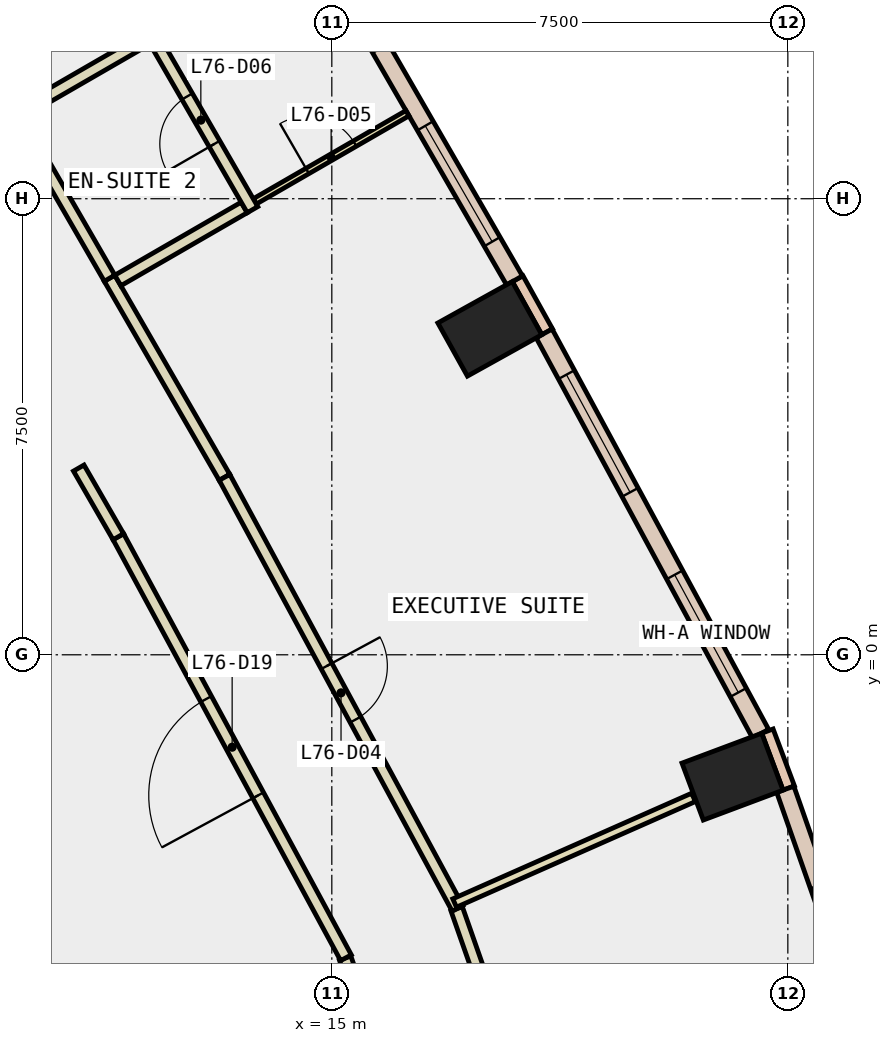
"""IFC4 building model, lengths in metres.
Left out: names, types, materials, properties, quantities, classifications, styles, units other than length and angle.
Written with IfcOpenShell. Run it as: python <this file> out.ifc"""

import sys

from ifc_helpers import new_model, si_unit, direction, frame, frame_2d, origin, origin_2d, place, context, subcontext, project, spatial, rectangle, extrude, element, fill, save


model = new_model("IFC4")
c1 = context("Model", 3, precision=1e-05, world=origin(), true_north=direction((0.0, 1.0)))
c2 = subcontext(c1, "Body", "Model", "MODEL_VIEW")
j1 = project(units=[si_unit("LENGTHUNIT", "METRE"), si_unit("PLANEANGLEUNIT", "RADIAN")], contexts=[c1])
p1 = place(None, origin())
s1 = spatial("IfcSite", under=j1, at=p1, CompositionType="ELEMENT")
p2 = place(p1, origin())
s2 = spatial("IfcBuilding", under=s1, at=p2, CompositionType="ELEMENT")
p3 = place(p2, frame((0.0, 0.0, 322.4)))
s3 = spatial("IfcBuildingStorey", under=s2, at=p3, CompositionType="ELEMENT", Elevation=322.4)
for number, where, z_axis, x_axis in (
    (1, (21.59, -2.004, -0.34), (0.0, 0.0, 1.0), (-0.351, 0.936, 0.0)),
    (2, (17.599, 5.36, -0.34), (0.0, 0.0, 1.0), (-0.486, 0.874, 0.0)),
):
    element("IfcColumn", number, at=place(p3, frame(where, z_axis=z_axis, x_axis=x_axis)), inside=s3, PredefinedType="COLUMN", context=c2, shape_type="SweptSolid", body=[
        extrude(rectangle(XDim=1.0, YDim=1.4, at=origin_2d()), origin(), (0.0, 0.0, 1.0), 3.34),
    ])
p4 = place(p3, frame((6.279, -3.625, -0.34), z_axis=(0.0, 0.0, 1.0), x_axis=(0.866017533419, -0.500013631625, 0.0)))
e3 = element("IfcWall", 3, at=p4, inside=s3, PredefinedType="SHEAR", context=c2, shape_type="SweptSolid", body=[
    extrude(rectangle(XDim=9.0, YDim=0.8, at=frame_2d((4.5, 0.0))), origin(), (0.0, 0.0, 1.0), 3.34),
])
p5 = place(p3, frame((22.515, -2.191, 0.0), z_axis=(0.0, 0.0, 1.0), x_axis=(-0.350962844851, 0.936389385637, 0.0)))
e4 = element("IfcWall", 4, at=p5, inside=s3, PredefinedType="STANDARD", context=c2, shape_type="SweptSolid", body=[
    extrude(rectangle(XDim=1.0, YDim=0.2, at=frame_2d((0.5, 0.0))), origin(), (0.0, 0.0, 1.0), 3.0),
])
p6 = place(p3, frame((18.542, 5.311, 0.0), z_axis=(0.0, 0.0, 1.0), x_axis=(-0.486036693078, 0.873938403425, 0.0)))
e5 = element("IfcWall", 5, at=p6, inside=s3, PredefinedType="STANDARD", context=c2, shape_type="SweptSolid", body=[
    extrude(rectangle(XDim=1.0, YDim=0.2, at=frame_2d((0.5, 0.0))), origin(), (0.0, 0.0, 1.0), 3.0),
])
p7 = place(p3, frame((24.029, -6.692, 0.0), z_axis=(0.0, 0.0, 1.0), x_axis=(-0.330923030855, 0.943657749213, 0.0)))
e6 = element("IfcWall", 6, at=p7, inside=s3, PredefinedType="STANDARD", context=c2, shape_type="SweptSolid", body=[
    extrude(rectangle(XDim=4.748, YDim=0.3, at=frame_2d((2.374, 0.0))), origin(), (0.0, 0.0, 1.0), 3.0),
])
p8 = place(p7, frame((1.674, 0.0, 0.9)))
e7 = element("IfcOpeningElement", 7, at=p8, cuts=e6, PredefinedType="OPENING", context=c2, shape_type="SweptSolid", body=[
    extrude(rectangle(XDim=1.4, YDim=2.0, at=frame_2d((0.7, 1.0))), frame((0.0, 0.16, 0.0), z_axis=(0.0, -1.0, 0.0), x_axis=(1.0, 0.0, 0.0)), (0.0, 0.0, 1.0), 0.32),
])
p9 = place(p3, frame((22.052, -1.298, 0.0), z_axis=(0.0, 0.0, 1.0), x_axis=(-0.475690331633, 0.879612817319, 0.0)))
e8 = element("IfcWall", 8, at=p9, inside=s3, PredefinedType="STANDARD", context=c2, shape_type="SweptSolid", body=[
    extrude(rectangle(XDim=7.484, YDim=0.3, at=frame_2d((3.742, 0.0))), origin(), (0.0, 0.0, 1.0), 3.0),
])
p10 = place(p9, frame((0.771, 0.0, 0.9)))
e9 = element("IfcOpeningElement", 9, at=p10, cuts=e8, PredefinedType="OPENING", context=c2, shape_type="SweptSolid", body=[
    extrude(rectangle(XDim=2.2, YDim=2.0, at=frame_2d((1.1, 1.0))), frame((0.0, 0.16, 0.0), z_axis=(0.0, -1.0, 0.0), x_axis=(1.0, 0.0, 0.0)), (0.0, 0.0, 1.0), 0.32),
])
p11 = place(p9, frame((4.513, 0.0, 0.9)))
e10 = element("IfcOpeningElement", 10, at=p11, cuts=e8, PredefinedType="OPENING", context=c2, shape_type="SweptSolid", body=[
    extrude(rectangle(XDim=2.2, YDim=2.0, at=frame_2d((1.1, 1.0))), frame((0.0, 0.16, 0.0), z_axis=(0.0, -1.0, 0.0), x_axis=(1.0, 0.0, 0.0)), (0.0, 0.0, 1.0), 0.32),
])
p12 = place(p3, frame((18.005, 6.156, 0.0), z_axis=(0.0, 0.0, 1.0), x_axis=(-0.499958474759, 0.866049377066, 0.0)))
e11 = element("IfcWall", 11, at=p12, inside=s3, PredefinedType="STANDARD", context=c2, shape_type="SweptSolid", body=[
    extrude(rectangle(XDim=7.342, YDim=0.3, at=frame_2d((3.671, 0.0))), origin(), (0.0, 0.0, 1.0), 3.0),
])
p13 = place(p12, frame((0.736, 0.0, 0.9)))
e12 = element("IfcOpeningElement", 12, at=p13, cuts=e11, PredefinedType="OPENING", context=c2, shape_type="SweptSolid", body=[
    extrude(rectangle(XDim=2.2, YDim=2.0, at=frame_2d((1.1, 1.0))), frame((0.0, 0.16, 0.0), z_axis=(0.0, -1.0, 0.0), x_axis=(1.0, 0.0, 0.0)), (0.0, 0.0, 1.0), 0.32),
])
p14 = place(p12, frame((4.407, 0.0, 0.9)))
e13 = element("IfcOpeningElement", 13, at=p14, cuts=e11, PredefinedType="OPENING", context=c2, shape_type="SweptSolid", body=[
    extrude(rectangle(XDim=2.2, YDim=2.0, at=frame_2d((1.1, 1.0))), frame((0.0, 0.16, 0.0), z_axis=(0.0, -1.0, 0.0), x_axis=(1.0, 0.0, 0.0)), (0.0, 0.0, 1.0), 0.32),
])
p15 = place(p3, frame((16.194, -7.768, 0.0), z_axis=(0.0, 0.0, 1.0), x_axis=(-0.330981563235, 0.943637220969, 0.0)))
e14 = element("IfcWall", 14, at=p15, inside=s3, PredefinedType="PARTITIONING", context=c2, shape_type="SweptSolid", body=[
    extrude(rectangle(XDim=2.946, YDim=0.2, at=frame_2d((1.473, 0.0))), origin(), (0.0, 0.0, 1.0), 3.0),
])
p16 = place(p3, frame((15.233, -4.982, 0.0), z_axis=(0.0, 0.0, 1.0), x_axis=(-0.475643534049, 0.879638123615, 0.0)))
e15 = element("IfcWall", 15, at=p16, inside=s3, PredefinedType="PARTITIONING", context=c2, shape_type="SweptSolid", body=[
    extrude(rectangle(XDim=7.871, YDim=0.2, at=frame_2d((3.936, 0.0))), origin(), (0.0, 0.0, 1.0), 3.0),
])
p17 = place(p16, frame((3.036, 0.0, 0.0)))
e16 = element("IfcOpeningElement", 16, at=p17, cuts=e15, PredefinedType="OPENING", context=c2, shape_type="SweptSolid", body=[
    extrude(rectangle(XDim=1.8, YDim=2.1, at=frame_2d((0.9, 1.05))), frame((0.0, 0.11, 0.0), z_axis=(0.0, -1.0, 0.0), x_axis=(1.0, 0.0, 0.0)), (0.0, 0.0, 1.0), 0.22),
])
p18 = place(p3, frame((11.489, 1.942, 0.0), z_axis=(0.0, 0.0, 1.0), x_axis=(-0.499544076393, 0.866288471435, 0.0)))
e17 = element("IfcWall", 17, at=p18, inside=s3, PredefinedType="PARTITIONING", context=c2, shape_type="SweptSolid", body=[
    extrude(rectangle(XDim=1.303, YDim=0.2, at=frame_2d((0.652, 0.0))), origin(), (0.0, 0.0, 1.0), 3.0),
])
p19 = place(p3, frame((17.053, -4.177, 0.0), z_axis=(0.0, 0.0, 1.0), x_axis=(0.33112192567, -0.943587977001, 0.0)))
e18 = element("IfcWall", 18, at=p19, inside=s3, PredefinedType="PARTITIONING", context=c2, shape_type="SweptSolid", body=[
    extrude(rectangle(XDim=3.678, YDim=0.2, at=frame_2d((1.839, 0.0))), origin(), (0.0, 0.0, 1.0), 3.0),
])
p20 = place(p3, frame((11.344, 6.193, 0.0), z_axis=(0.0, 0.0, 1.0), x_axis=(0.50004096614, -0.86600175068, 0.0)))
e19 = element("IfcWall", 19, at=p20, inside=s3, PredefinedType="PARTITIONING", context=c2, shape_type="SweptSolid", body=[
    extrude(rectangle(XDim=3.782, YDim=0.2, at=frame_2d((1.891, 0.0))), origin(), (0.0, 0.0, 1.0), 3.0),
])
p21 = place(p3, frame((13.235, 2.918, 0.0), z_axis=(0.0, 0.0, 1.0), x_axis=(0.475681790703, -0.879617436158, 0.0)))
e20 = element("IfcWall", 20, at=p21, inside=s3, PredefinedType="PARTITIONING", context=c2, shape_type="SweptSolid", body=[
    extrude(rectangle(XDim=8.058, YDim=0.2, at=frame_2d((4.029, 0.0))), origin(), (0.0, 0.0, 1.0), 3.0),
])
p22 = place(p21, frame((3.529, 0.0, 0.0)))
e21 = element("IfcOpeningElement", 21, at=p22, cuts=e20, PredefinedType="OPENING", context=c2, shape_type="SweptSolid", body=[
    extrude(rectangle(XDim=1.0, YDim=2.1, at=frame_2d((0.5, 1.05))), frame((0.0, 0.11, 0.0), z_axis=(0.0, -1.0, 0.0), x_axis=(1.0, 0.0, 0.0)), (0.0, 0.0, 1.0), 0.22),
])
p23 = place(p3, frame((9.744, 8.964, 0.0), z_axis=(0.0, 0.0, 1.0), x_axis=(0.500290307618, -0.865857729713, 0.0)))
e22 = element("IfcWall", 22, at=p23, inside=s3, PredefinedType="PARTITIONING", context=c2, shape_type="SweptSolid", body=[
    extrude(rectangle(XDim=3.2, YDim=0.2, at=frame_2d((1.6, 0.0))), origin(), (0.0, 0.0, 1.0), 3.0),
])
p24 = place(p3, frame((17.02, -4.082, 0.0), z_axis=(0.0, 0.0, 1.0), x_axis=(0.914599611743, 0.404360668462, 0.0)))
e23 = element("IfcWall", 23, at=p24, inside=s3, PredefinedType="PARTITIONING", context=c2, shape_type="SweptSolid", body=[
    extrude(rectangle(XDim=4.296, YDim=0.15, at=frame_2d((2.148, 0.0))), origin(), (0.0, 0.0, 1.0), 3.0),
])
p25 = place(p3, frame((13.733, 7.456, 0.0), z_axis=(0.0, 0.0, 1.0), x_axis=(0.865990674793, 0.500060147554, 0.0)))
e24 = element("IfcWall", 24, at=p25, inside=s3, PredefinedType="PARTITIONING", context=c2, shape_type="SweptSolid", body=[
    extrude(rectangle(XDim=2.9, YDim=0.1, at=frame_2d((1.45, 0.0))), origin(), (0.0, 0.0, 1.0), 3.0),
])
p26 = place(p25, frame((1.0, 0.0, 0.0)))
e25 = element("IfcOpeningElement", 25, at=p26, cuts=e24, PredefinedType="OPENING", context=c2, shape_type="SweptSolid", body=[
    extrude(rectangle(XDim=0.9, YDim=2.1, at=frame_2d((0.45, 1.05))), frame((0.0, 0.06, 0.0), z_axis=(0.0, -1.0, 0.0), x_axis=(1.0, 0.0, 0.0)), (0.0, 0.0, 1.0), 0.12),
])
p27 = place(p3, frame((11.481, 6.156, 0.0), z_axis=(0.0, 0.0, 1.0), x_axis=(0.865999212041, 0.500045362686, 0.0)))
e26 = element("IfcWall", 26, at=p27, inside=s3, PredefinedType="PARTITIONING", context=c2, shape_type="SweptSolid", body=[
    extrude(rectangle(XDim=2.4, YDim=0.2, at=frame_2d((1.2, 0.0))), origin(), (0.0, 0.0, 1.0), 3.0),
])
p28 = place(p3, frame((13.696, 7.32, 0.0), z_axis=(0.0, 0.0, 1.0), x_axis=(-0.500070584245, 0.865984648116, 0.0)))
e27 = element("IfcWall", 27, at=p28, inside=s3, PredefinedType="PARTITIONING", context=c2, shape_type="SweptSolid", body=[
    extrude(rectangle(XDim=3.399, YDim=0.2, at=frame_2d((1.7, 0.0))), origin(), (0.0, 0.0, 1.0), 3.0),
])
p29 = place(p28, frame((1.25, 0.0, 0.0)))
e28 = element("IfcOpeningElement", 28, at=p29, cuts=e27, PredefinedType="OPENING", context=c2, shape_type="SweptSolid", body=[
    extrude(rectangle(XDim=0.9, YDim=2.1, at=frame_2d((0.45, 1.05))), frame((0.0, 0.11, 0.0), z_axis=(0.0, -1.0, 0.0), x_axis=(1.0, 0.0, 0.0)), (0.0, 0.0, 1.0), 0.22),
])
p30 = place(p3, frame((11.959, 10.127, 0.0), z_axis=(0.0, 0.0, 1.0), x_axis=(-0.866022959057, -0.500004234368, 0.0)))
e29 = element("IfcWall", 29, at=p30, inside=s3, PredefinedType="PARTITIONING", context=c2, shape_type="SweptSolid", body=[
    extrude(rectangle(XDim=2.5, YDim=0.2, at=frame_2d((1.25, 0.0))), origin(), (0.0, 0.0, 1.0), 3.0),
])
p31 = place(p10, origin())
e30 = element("IfcWindow", 30, at=p31, inside=s3, PartitioningType="SINGLE_PANEL", PredefinedType="WINDOW", context=c2, shape_type="SweptSolid", body=[
    extrude(rectangle(XDim=2.2, YDim=2.0, at=frame_2d((1.1, 1.0))), frame((0.0, 0.03, 0.0), z_axis=(0.0, -1.0, 0.0), x_axis=(1.0, 0.0, 0.0)), (0.0, 0.0, 1.0), 0.06),
])
fill(e9, e30)
p32 = place(p11, origin())
e31 = element("IfcWindow", 31, at=p32, inside=s3, PartitioningType="SINGLE_PANEL", PredefinedType="WINDOW", context=c2, shape_type="SweptSolid", body=[
    extrude(rectangle(XDim=2.2, YDim=2.0, at=frame_2d((1.1, 1.0))), frame((0.0, 0.03, 0.0), z_axis=(0.0, -1.0, 0.0), x_axis=(1.0, 0.0, 0.0)), (0.0, 0.0, 1.0), 0.06),
])
fill(e10, e31)
p33 = place(p13, origin())
e32 = element("IfcWindow", 32, at=p33, inside=s3, PartitioningType="SINGLE_PANEL", PredefinedType="WINDOW", context=c2, shape_type="SweptSolid", body=[
    extrude(rectangle(XDim=2.2, YDim=2.0, at=frame_2d((1.1, 1.0))), frame((0.0, 0.03, 0.0), z_axis=(0.0, -1.0, 0.0), x_axis=(1.0, 0.0, 0.0)), (0.0, 0.0, 1.0), 0.06),
])
fill(e12, e32)
p34 = place(p22, origin())
e33 = element("IfcDoor", 33, at=p34, inside=s3, OperationType="SINGLE_SWING_LEFT", PredefinedType="DOOR", context=c2, shape_type="SweptSolid", body=[
    extrude(rectangle(XDim=1.0, YDim=2.1, at=frame_2d((0.5, 1.05))), frame((0.0, 0.025, 0.0), z_axis=(0.0, -1.0, 0.0), x_axis=(1.0, 0.0, 0.0)), (0.0, 0.0, 1.0), 0.05),
])
fill(e21, e33)
p35 = place(p26, origin())
e34 = element("IfcDoor", 34, at=p35, inside=s3, OperationType="SINGLE_SWING_LEFT", PredefinedType="DOOR", context=c2, shape_type="SweptSolid", body=[
    extrude(rectangle(XDim=0.9, YDim=2.1, at=frame_2d((0.45, 1.05))), frame((0.0, 0.025, 0.0), z_axis=(0.0, -1.0, 0.0), x_axis=(1.0, 0.0, 0.0)), (0.0, 0.0, 1.0), 0.05),
])
fill(e25, e34)
p36 = place(p29, origin())
e35 = element("IfcDoor", 35, at=p36, inside=s3, OperationType="SINGLE_SWING_LEFT", PredefinedType="DOOR", context=c2, shape_type="SweptSolid", body=[
    extrude(rectangle(XDim=0.9, YDim=2.1, at=frame_2d((0.45, 1.05))), frame((0.0, 0.025, 0.0), z_axis=(0.0, -1.0, 0.0), x_axis=(1.0, 0.0, 0.0)), (0.0, 0.0, 1.0), 0.05),
])
fill(e28, e35)
p37 = place(p17, origin())
e36 = element("IfcDoor", 36, at=p37, inside=s3, OperationType="DOUBLE_DOOR_SINGLE_SWING", PredefinedType="DOOR", context=c2, shape_type="SweptSolid", body=[
    extrude(rectangle(XDim=1.8, YDim=2.1, at=frame_2d((0.9, 1.05))), frame((0.0, 0.025, 0.0), z_axis=(0.0, -1.0, 0.0), x_axis=(1.0, 0.0, 0.0)), (0.0, 0.0, 1.0), 0.05),
])
fill(e16, e36)
save(model, sys.argv[1])
